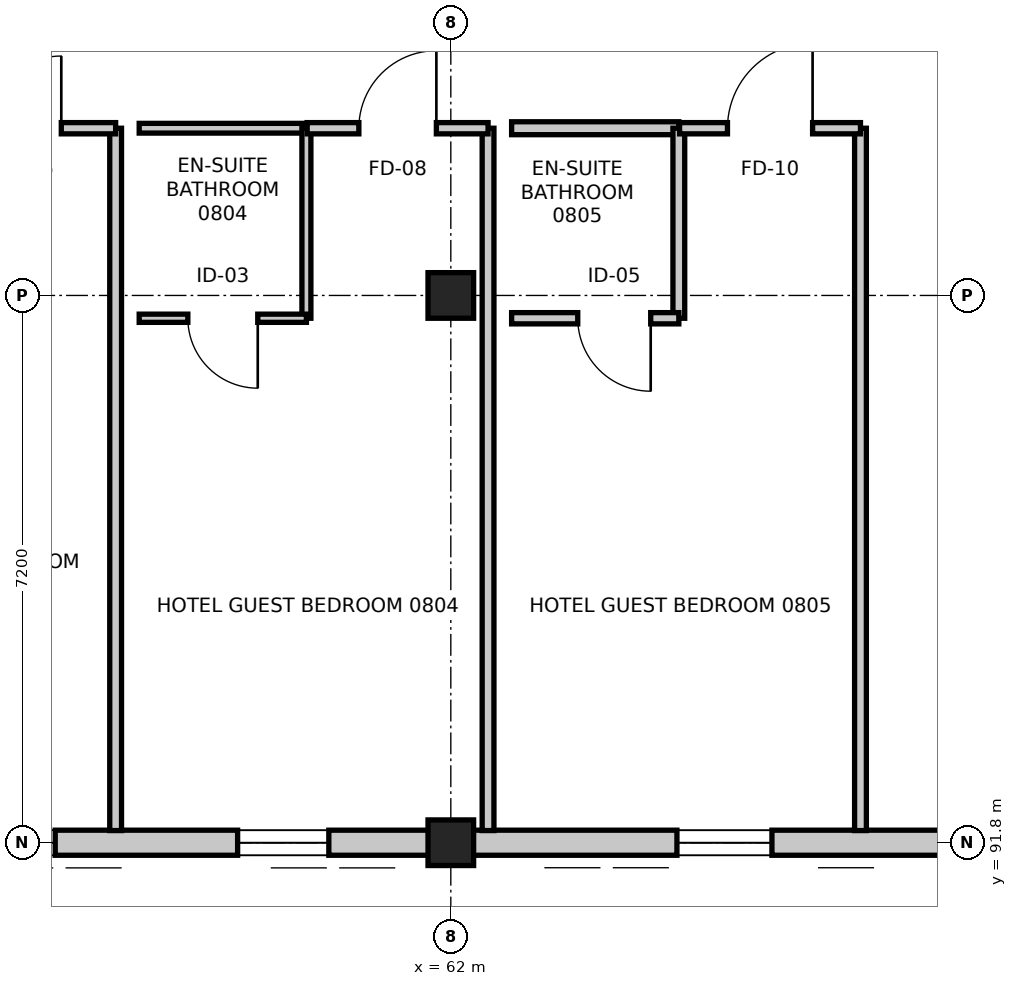
"""IFC4 building model, lengths in metres.
Left out: names, types, materials, properties, quantities, classifications, styles, units other than length and angle.
Written with IfcOpenShell. Run it as: python <this file> out.ifc"""

import sys

from ifc_helpers import new_model, si_unit, direction, frame, frame_2d, origin, origin_2d, place, context, subcontext, project, spatial, rectangle, extrude, element, fill, save


model = new_model("IFC4")
c1 = context("Model", 3, precision=1e-05, world=origin(), true_north=direction((0.0, 1.0)))
c2 = subcontext(c1, "Body", "Model", "MODEL_VIEW")
j1 = project(units=[si_unit("LENGTHUNIT", "METRE"), si_unit("PLANEANGLEUNIT", "RADIAN")], contexts=[c1])
p1 = place(None, origin())
s1 = spatial("IfcSite", under=j1, at=p1, CompositionType="ELEMENT")
p2 = place(p1, origin())
s2 = spatial("IfcBuilding", under=s1, at=p2, CompositionType="ELEMENT")
p3 = place(p2, frame((0.0, 0.0, 33.6)))
s3 = spatial("IfcBuildingStorey", under=s2, at=p3, CompositionType="ELEMENT", Elevation=33.6)
for number, where, z_axis, x_axis in (
    (1, (62.0, 91.8, 0.0), (0.0, 0.0, 1.0), (1.0, 0.0, 0.0)),
    (2, (62.0, 99.0, 0.0), (0.0, 0.0, 1.0), (1.0, 0.0, 0.0)),
):
    element("IfcColumn", number, at=place(p3, frame(where, z_axis=z_axis, x_axis=x_axis)), inside=s3, PredefinedType="COLUMN", context=c2, shape_type="SweptSolid", body=[
        extrude(rectangle(XDim=0.6, YDim=0.6, at=origin_2d()), origin(), (0.0, 0.0, 1.0), 3.6),
    ])
p4 = place(p3, frame((69.2, 91.8, 0.0), z_axis=(0.0, 0.0, 1.0), x_axis=(-1.0, 0.0, 0.0)))
e3 = element("IfcWall", 3, at=p4, inside=s3, PredefinedType="STANDARD", context=c2, shape_type="SweptSolid", body=[
    extrude(rectangle(XDim=7.2, YDim=0.33, at=frame_2d((3.6, 0.0))), origin(), (0.0, 0.0, 1.0), 2.745),
])
p5 = place(p4, frame((2.975, 0.0, 0.75)))
e4 = element("IfcOpeningElement", 4, at=p5, cuts=e3, PredefinedType="OPENING", context=c2, shape_type="SweptSolid", body=[
    extrude(rectangle(XDim=1.25, YDim=1.75, at=frame_2d((0.625, 0.875))), frame((0.0, 0.175, 0.0), z_axis=(0.0, -1.0, 0.0), x_axis=(1.0, 0.0, 0.0)), (0.0, 0.0, 1.0), 0.35),
])
p6 = place(p3, frame((62.0, 91.8, 0.0), z_axis=(0.0, 0.0, 1.0), x_axis=(-1.0, 0.0, 0.0)))
e5 = element("IfcWall", 5, at=p6, inside=s3, PredefinedType="STANDARD", context=c2, shape_type="SweptSolid", body=[
    extrude(rectangle(XDim=7.2, YDim=0.33, at=frame_2d((3.6, 0.0))), origin(), (0.0, 0.0, 1.0), 2.745),
])
p7 = place(p6, frame((1.605, 0.0, 0.75)))
e6 = element("IfcOpeningElement", 6, at=p7, cuts=e5, PredefinedType="OPENING", context=c2, shape_type="SweptSolid", body=[
    extrude(rectangle(XDim=1.2, YDim=1.75, at=frame_2d((0.6, 0.875))), frame((0.0, 0.175, 0.0), z_axis=(0.0, -1.0, 0.0), x_axis=(1.0, 0.0, 0.0)), (0.0, 0.0, 1.0), 0.35),
])
p8 = place(p6, frame((5.205, 0.0, 0.75)))
e7 = element("IfcOpeningElement", 7, at=p8, cuts=e5, PredefinedType="OPENING", context=c2, shape_type="SweptSolid", body=[
    extrude(rectangle(XDim=1.2, YDim=1.75, at=frame_2d((0.6, 0.875))), frame((0.0, 0.175, 0.0), z_axis=(0.0, -1.0, 0.0), x_axis=(1.0, 0.0, 0.0)), (0.0, 0.0, 1.0), 0.35),
])
p9 = place(p3, frame((57.59, 101.2, 0.0), z_axis=(0.0, 0.0, 1.0), x_axis=(0.0, -1.0, 0.0)))
e8 = element("IfcWall", 8, at=p9, inside=s3, PredefinedType="PARTITIONING", context=c2, shape_type="SweptSolid", body=[
    extrude(rectangle(XDim=9.24, YDim=0.155, at=frame_2d((4.62, 0.0))), origin(), (0.0, 0.0, 1.0), 2.745),
])
p10 = place(p3, frame((55.21, 101.2, 0.0), z_axis=(0.0, 0.0, 1.0), x_axis=(1.0, 0.0, 0.0)))
e9 = element("IfcWall", 9, at=p10, inside=s3, PredefinedType="PARTITIONING", context=c2, shape_type="SweptSolid", body=[
    extrude(rectangle(XDim=2.38, YDim=0.148, at=frame_2d((1.19, 0.0))), origin(), (0.0, 0.0, 1.0), 3.36),
])
p11 = place(p10, frame((0.715, 0.0, 0.0)))
e10 = element("IfcOpeningElement", 10, at=p11, cuts=e9, PredefinedType="OPENING", context=c2, shape_type="SweptSolid", body=[
    extrude(rectangle(XDim=0.95, YDim=2.1, at=frame_2d((0.475, 1.05))), frame((0.0, 0.084, 0.0), z_axis=(0.0, -1.0, 0.0), x_axis=(1.0, 0.0, 0.0)), (0.0, 0.0, 1.0), 0.168),
])
p12 = place(p3, frame((57.9, 101.2, 0.0), z_axis=(0.0, 0.0, 1.0), x_axis=(1.0, 0.0, 0.0)))
e11 = element("IfcWall", 11, at=p12, inside=s3, PredefinedType="PARTITIONING", context=c2, shape_type="SweptSolid", body=[
    extrude(rectangle(XDim=2.2, YDim=0.128, at=frame_2d((1.1, 0.0))), origin(), (0.0, 0.0, 1.0), 3.36),
])
p13 = place(p3, frame((60.1, 101.2, 0.0), z_axis=(0.0, 0.0, 1.0), x_axis=(0.0, -1.0, 0.0)))
e12 = element("IfcWall", 12, at=p13, inside=s3, PredefinedType="PARTITIONING", context=c2, shape_type="SweptSolid", body=[
    extrude(rectangle(XDim=2.5, YDim=0.118, at=frame_2d((1.25, 0.0))), origin(), (0.0, 0.0, 1.0), 2.745),
])
p14 = place(p3, frame((60.1, 98.7, 0.0), z_axis=(0.0, 0.0, 1.0), x_axis=(-1.0, 0.0, 0.0)))
e13 = element("IfcWall", 13, at=p14, inside=s3, PredefinedType="PARTITIONING", context=c2, shape_type="SweptSolid", body=[
    extrude(rectangle(XDim=2.2, YDim=0.108, at=frame_2d((1.1, 0.0))), origin(), (0.0, 0.0, 1.0), 3.36),
])
p15 = place(p14, frame((0.64, 0.0, 0.0)))
e14 = element("IfcOpeningElement", 14, at=p15, cuts=e13, PredefinedType="OPENING", context=c2, shape_type="SweptSolid", body=[
    extrude(rectangle(XDim=0.92, YDim=2.1, at=frame_2d((0.46, 1.05))), frame((0.0, 0.064, 0.0), z_axis=(0.0, -1.0, 0.0), x_axis=(1.0, 0.0, 0.0)), (0.0, 0.0, 1.0), 0.128),
])
p16 = place(p3, frame((62.49, 101.2, 0.0), z_axis=(0.0, 0.0, 1.0), x_axis=(0.0, -1.0, 0.0)))
e15 = element("IfcWall", 15, at=p16, inside=s3, PredefinedType="PARTITIONING", context=c2, shape_type="SweptSolid", body=[
    extrude(rectangle(XDim=9.24, YDim=0.155, at=frame_2d((4.62, 0.0))), origin(), (0.0, 0.0, 1.0), 2.745),
])
p17 = place(p3, frame((60.11, 101.2, 0.0), z_axis=(0.0, 0.0, 1.0), x_axis=(1.0, 0.0, 0.0)))
e16 = element("IfcWall", 16, at=p17, inside=s3, PredefinedType="PARTITIONING", context=c2, shape_type="SweptSolid", body=[
    extrude(rectangle(XDim=2.38, YDim=0.148, at=frame_2d((1.19, 0.0))), origin(), (0.0, 0.0, 1.0), 2.695),
])
p18 = place(p17, frame((0.68, 0.0, 0.0)))
e17 = element("IfcOpeningElement", 17, at=p18, cuts=e16, PredefinedType="OPENING", context=c2, shape_type="SweptSolid", body=[
    extrude(rectangle(XDim=1.02, YDim=2.15, at=frame_2d((0.51, 1.075))), frame((0.0, 0.084, 0.0), z_axis=(0.0, -1.0, 0.0), x_axis=(1.0, 0.0, 0.0)), (0.0, 0.0, 1.0), 0.168),
])
p19 = place(p3, frame((62.8, 101.2, 0.0), z_axis=(0.0, 0.0, 1.0), x_axis=(1.0, 0.0, 0.0)))
e18 = element("IfcWall", 18, at=p19, inside=s3, PredefinedType="PARTITIONING", context=c2, shape_type="SweptSolid", body=[
    extrude(rectangle(XDim=2.2, YDim=0.17, at=frame_2d((1.1, 0.0))), origin(), (0.0, 0.0, 1.0), 3.36),
])
p20 = place(p3, frame((65.0, 101.2, 0.0), z_axis=(0.0, 0.0, 1.0), x_axis=(0.0, -1.0, 0.0)))
e19 = element("IfcWall", 19, at=p20, inside=s3, PredefinedType="PARTITIONING", context=c2, shape_type="SweptSolid", body=[
    extrude(rectangle(XDim=2.5, YDim=0.155, at=frame_2d((1.25, 0.0))), origin(), (0.0, 0.0, 1.0), 2.745),
])
p21 = place(p3, frame((65.0, 98.7, 0.0), z_axis=(0.0, 0.0, 1.0), x_axis=(-1.0, 0.0, 0.0)))
e20 = element("IfcWall", 20, at=p21, inside=s3, PredefinedType="PARTITIONING", context=c2, shape_type="SweptSolid", body=[
    extrude(rectangle(XDim=2.2, YDim=0.148, at=frame_2d((1.1, 0.0))), origin(), (0.0, 0.0, 1.0), 3.36),
])
p22 = place(p21, frame((0.37, 0.0, 0.0)))
e21 = element("IfcOpeningElement", 21, at=p22, cuts=e20, PredefinedType="OPENING", context=c2, shape_type="SweptSolid", body=[
    extrude(rectangle(XDim=0.96, YDim=2.14, at=frame_2d((0.48, 1.07))), frame((0.0, 0.084, 0.0), z_axis=(0.0, -1.0, 0.0), x_axis=(1.0, 0.0, 0.0)), (0.0, 0.0, 1.0), 0.168),
])
p23 = place(p3, frame((67.39, 101.2, 0.0), z_axis=(0.0, 0.0, 1.0), x_axis=(0.0, -1.0, 0.0)))
e22 = element("IfcWall", 22, at=p23, inside=s3, PredefinedType="PARTITIONING", context=c2, shape_type="SweptSolid", body=[
    extrude(rectangle(XDim=9.24, YDim=0.155, at=frame_2d((4.62, 0.0))), origin(), (0.0, 0.0, 1.0), 2.745),
])
p24 = place(p3, frame((65.01, 101.2, 0.0), z_axis=(0.0, 0.0, 1.0), x_axis=(1.0, 0.0, 0.0)))
e23 = element("IfcWall", 23, at=p24, inside=s3, PredefinedType="PARTITIONING", context=c2, shape_type="SweptSolid", body=[
    extrude(rectangle(XDim=2.38, YDim=0.148, at=frame_2d((1.19, 0.0))), origin(), (0.0, 0.0, 1.0), 3.36),
])
p25 = place(p24, frame((0.63, 0.0, 0.0)))
e24 = element("IfcOpeningElement", 24, at=p25, cuts=e23, PredefinedType="OPENING", context=c2, shape_type="SweptSolid", body=[
    extrude(rectangle(XDim=1.12, YDim=2.2, at=frame_2d((0.56, 1.1))), frame((0.0, 0.084, 0.0), z_axis=(0.0, -1.0, 0.0), x_axis=(1.0, 0.0, 0.0)), (0.0, 0.0, 1.0), 0.168),
])
p26 = place(p5, origin())
e25 = element("IfcWindow", 25, at=p26, inside=s3, PartitioningType="SINGLE_PANEL", PredefinedType="WINDOW", context=c2, shape_type="SweptSolid", body=[
    extrude(rectangle(XDim=1.25, YDim=1.75, at=frame_2d((0.625, 0.875))), frame((0.0, 0.03, 0.0), z_axis=(0.0, -1.0, 0.0), x_axis=(1.0, 0.0, 0.0)), (0.0, 0.0, 1.0), 0.06),
])
fill(e4, e25)
p27 = place(p7, origin())
e26 = element("IfcWindow", 26, at=p27, inside=s3, PartitioningType="SINGLE_PANEL", PredefinedType="WINDOW", context=c2, shape_type="SweptSolid", body=[
    extrude(rectangle(XDim=1.2, YDim=1.75, at=frame_2d((0.6, 0.875))), frame((0.0, 0.03, 0.0), z_axis=(0.0, -1.0, 0.0), x_axis=(1.0, 0.0, 0.0)), (0.0, 0.0, 1.0), 0.06),
])
fill(e6, e26)
p28 = place(p11, origin())
e27 = element("IfcDoor", 27, at=p28, inside=s3, OperationType="SINGLE_SWING_RIGHT", PredefinedType="DOOR", context=c2, shape_type="SweptSolid", body=[
    extrude(rectangle(XDim=0.95, YDim=2.1, at=frame_2d((0.475, 1.05))), frame((0.0, 0.025, 0.0), z_axis=(0.0, -1.0, 0.0), x_axis=(1.0, 0.0, 0.0)), (0.0, 0.0, 1.0), 0.05),
])
fill(e10, e27)
p29 = place(p15, origin())
e28 = element("IfcDoor", 28, at=p29, inside=s3, OperationType="SINGLE_SWING_LEFT", PredefinedType="DOOR", context=c2, shape_type="SweptSolid", body=[
    extrude(rectangle(XDim=0.92, YDim=2.1, at=frame_2d((0.46, 1.05))), frame((0.0, 0.025, 0.0), z_axis=(0.0, -1.0, 0.0), x_axis=(1.0, 0.0, 0.0)), (0.0, 0.0, 1.0), 0.05),
])
fill(e14, e28)
p30 = place(p18, origin())
e29 = element("IfcDoor", 29, at=p30, inside=s3, OperationType="SINGLE_SWING_RIGHT", PredefinedType="DOOR", context=c2, shape_type="SweptSolid", body=[
    extrude(rectangle(XDim=1.02, YDim=2.15, at=frame_2d((0.51, 1.075))), frame((0.0, 0.025, 0.0), z_axis=(0.0, -1.0, 0.0), x_axis=(1.0, 0.0, 0.0)), (0.0, 0.0, 1.0), 0.05),
])
fill(e17, e29)
p31 = place(p22, origin())
e30 = element("IfcDoor", 30, at=p31, inside=s3, OperationType="SINGLE_SWING_LEFT", PredefinedType="DOOR", context=c2, shape_type="SweptSolid", body=[
    extrude(rectangle(XDim=0.96, YDim=2.14, at=frame_2d((0.48, 1.07))), frame((0.0, 0.025, 0.0), z_axis=(0.0, -1.0, 0.0), x_axis=(1.0, 0.0, 0.0)), (0.0, 0.0, 1.0), 0.05),
])
fill(e21, e30)
p32 = place(p25, origin())
e31 = element("IfcDoor", 31, at=p32, inside=s3, OperationType="SINGLE_SWING_RIGHT", PredefinedType="DOOR", context=c2, shape_type="SweptSolid", body=[
    extrude(rectangle(XDim=1.12, YDim=2.2, at=frame_2d((0.56, 1.1))), frame((0.0, 0.025, 0.0), z_axis=(0.0, -1.0, 0.0), x_axis=(1.0, 0.0, 0.0)), (0.0, 0.0, 1.0), 0.05),
])
fill(e24, e31)
p33 = place(p8, origin())
e32 = element("IfcWindow", 32, at=p33, inside=s3, PartitioningType="SINGLE_PANEL", PredefinedType="WINDOW", context=c2, shape_type="SweptSolid", body=[
    extrude(rectangle(XDim=1.2, YDim=1.75, at=frame_2d((0.6, 0.875))), frame((0.0, 0.03, 0.0), z_axis=(0.0, -1.0, 0.0), x_axis=(1.0, 0.0, 0.0)), (0.0, 0.0, 1.0), 0.06),
])
fill(e7, e32)
save(model, sys.argv[1])
